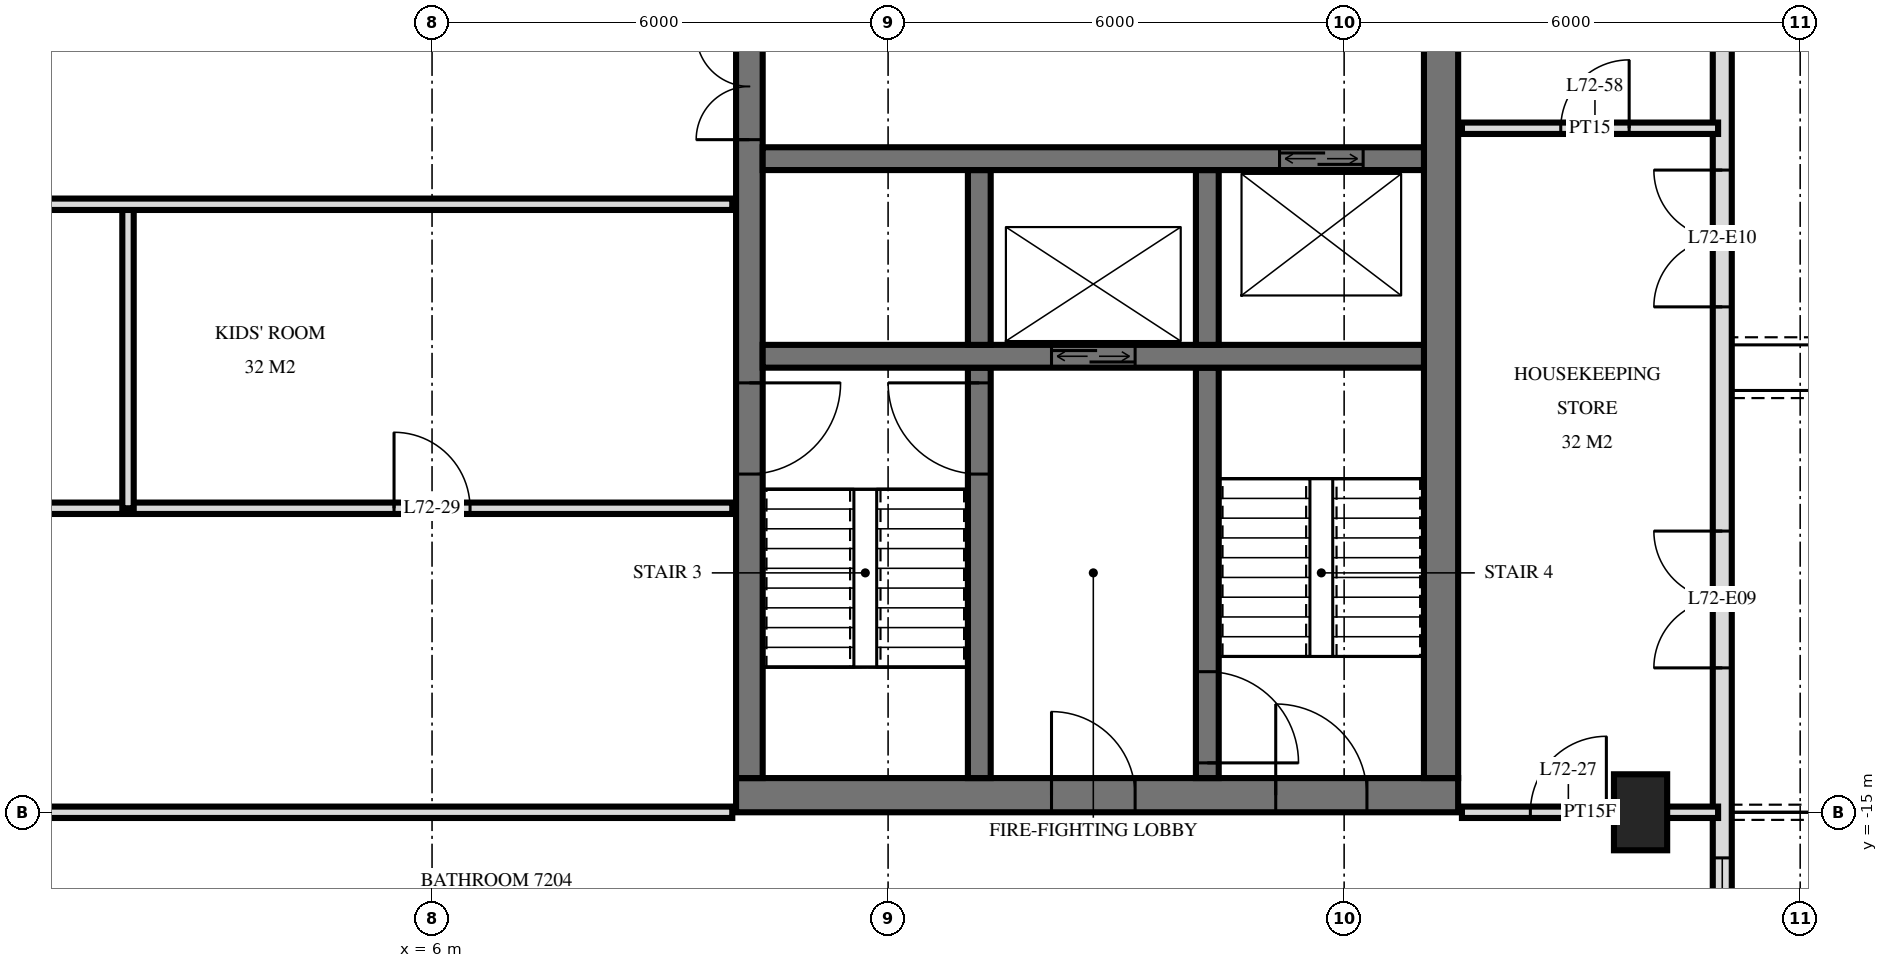
"""IFC4 building model, lengths in metres.
Left out: names, types, materials, properties, quantities, classifications, styles, units other than length and angle.
Written with IfcOpenShell. Run it as: python <this file> out.ifc"""

import sys

from ifc_helpers import new_model, si_unit, direction, frame, frame_2d, origin, origin_2d, place, context, subcontext, project, spatial, rectangle, extrude, element, fill, save


model = new_model("IFC4")
c1 = context("Model", 3, precision=1e-05, world=origin(), true_north=direction((0.0, 1.0)))
c2 = subcontext(c1, "Body", "Model", "MODEL_VIEW")
j1 = project(units=[si_unit("LENGTHUNIT", "METRE"), si_unit("PLANEANGLEUNIT", "RADIAN")], contexts=[c1])
p1 = place(None, origin())
s1 = spatial("IfcSite", under=j1, at=p1, CompositionType="ELEMENT")
p2 = place(p1, origin())
s2 = spatial("IfcBuilding", under=s1, at=p2, CompositionType="ELEMENT")
p3 = place(p2, frame((0.0, 0.0, 273.6)))
s3 = spatial("IfcBuildingStorey", under=s2, at=p3, CompositionType="ELEMENT", Elevation=273.6)
p4 = place(p3, frame((21.9, -15.0, 0.0), z_axis=(0.0, 0.0, 1.0), x_axis=(0.0, 1.0, 0.0)))
e1 = element("IfcColumn", 1, at=p4, inside=s3, PredefinedType="COLUMN", context=c2, shape_type="SweptSolid", body=[
    extrude(rectangle(XDim=1.0, YDim=0.7, at=origin_2d()), origin(), (0.0, 0.0, 1.0), 3.5),
])
p5 = place(p3, frame((10.0, -14.775, 0.0), z_axis=(0.0, 0.0, 1.0), x_axis=(1.0, 0.0, 0.0)))
e2 = element("IfcWall", 2, at=p5, inside=s3, PredefinedType="SHEAR", context=c2, shape_type="SweptSolid", body=[
    extrude(rectangle(XDim=9.5, YDim=0.45, at=frame_2d((4.75, 0.0))), origin(), (0.0, 0.0, 1.0), 3.5),
])
p6 = place(p5, frame((7.1, 0.0, 0.0)))
e3 = element("IfcOpeningElement", 3, at=p6, cuts=e2, PredefinedType="OPENING", context=c2, shape_type="SweptSolid", body=[
    extrude(rectangle(XDim=1.2, YDim=2.1, at=frame_2d((0.6, 1.05))), frame((0.0, 0.235, 0.0), z_axis=(0.0, -1.0, 0.0), x_axis=(1.0, 0.0, 0.0)), (0.0, 0.0, 1.0), 0.47),
])
p7 = place(p5, frame((4.15, 0.0, 0.0)))
e4 = element("IfcOpeningElement", 4, at=p7, cuts=e2, PredefinedType="OPENING", context=c2, shape_type="SweptSolid", body=[
    extrude(rectangle(XDim=1.1, YDim=2.1, at=frame_2d((0.55, 1.05))), frame((0.0, 0.235, 0.0), z_axis=(0.0, -1.0, 0.0), x_axis=(1.0, 0.0, 0.0)), (0.0, 0.0, 1.0), 0.47),
])
p8 = place(p3, frame((10.175, -14.55, 0.0), z_axis=(0.0, 0.0, 1.0), x_axis=(0.0, 1.0, 0.0)))
e5 = element("IfcWall", 5, at=p8, inside=s3, PredefinedType="SHEAR", context=c2, shape_type="SweptSolid", body=[
    extrude(rectangle(XDim=14.1, YDim=0.35, at=frame_2d((7.05, 0.0))), origin(), (0.0, 0.0, 1.0), 3.5),
])
p9 = place(p8, frame((8.4, 0.0, 0.0)))
e6 = element("IfcOpeningElement", 6, at=p9, cuts=e5, PredefinedType="OPENING", context=c2, shape_type="SweptSolid", body=[
    extrude(rectangle(XDim=1.4, YDim=2.4, at=frame_2d((0.7, 1.2))), frame((0.0, 0.185, 0.0), z_axis=(0.0, -1.0, 0.0), x_axis=(1.0, 0.0, 0.0)), (0.0, 0.0, 1.0), 0.37),
])
p10 = place(p8, frame((10.0, 0.0, 0.0)))
e7 = element("IfcOpeningElement", 7, at=p10, cuts=e5, PredefinedType="OPENING", context=c2, shape_type="SweptSolid", body=[
    extrude(rectangle(XDim=1.4, YDim=2.4, at=frame_2d((0.7, 1.2))), frame((0.0, 0.185, 0.0), z_axis=(0.0, -1.0, 0.0), x_axis=(1.0, 0.0, 0.0)), (0.0, 0.0, 1.0), 0.37),
])
p11 = place(p8, frame((4.0, 0.0, 0.0)))
e8 = element("IfcOpeningElement", 8, at=p11, cuts=e5, PredefinedType="OPENING", context=c2, shape_type="SweptSolid", body=[
    extrude(rectangle(XDim=1.2, YDim=2.1, at=frame_2d((0.6, 1.05))), frame((0.0, 0.185, 0.0), z_axis=(0.0, -1.0, 0.0), x_axis=(1.0, 0.0, 0.0)), (0.0, 0.0, 1.0), 0.37),
])
p12 = place(p3, frame((19.275, -14.55, 0.0), z_axis=(0.0, 0.0, 1.0), x_axis=(0.0, 1.0, 0.0)))
e9 = element("IfcWall", 9, at=p12, inside=s3, PredefinedType="SHEAR", context=c2, shape_type="SweptSolid", body=[
    extrude(rectangle(XDim=14.1, YDim=0.45, at=frame_2d((7.05, 0.0))), origin(), (0.0, 0.0, 1.0), 3.5),
])
p13 = place(p3, frame((10.35, -6.4, 0.0), z_axis=(0.0, 0.0, 1.0), x_axis=(1.0, 0.0, 0.0)))
e10 = element("IfcWall", 10, at=p13, inside=s3, PredefinedType="SHEAR", context=c2, shape_type="SweptSolid", body=[
    extrude(rectangle(XDim=8.7, YDim=0.3, at=frame_2d((4.35, 0.0))), origin(), (0.0, 0.0, 1.0), 3.5),
])
p14 = place(p13, frame((6.8, 0.0, 0.0)))
e11 = element("IfcOpeningElement", 11, at=p14, cuts=e10, PredefinedType="OPENING", context=c2, shape_type="SweptSolid", body=[
    extrude(rectangle(XDim=1.1, YDim=2.1, at=frame_2d((0.55, 1.05))), frame((0.0, 0.16, 0.0), z_axis=(0.0, -1.0, 0.0), x_axis=(1.0, 0.0, 0.0)), (0.0, 0.0, 1.0), 0.32),
])
p15 = place(p3, frame((10.35, -9.0, 0.0), z_axis=(0.0, 0.0, 1.0), x_axis=(1.0, 0.0, 0.0)))
e12 = element("IfcWall", 12, at=p15, inside=s3, PredefinedType="SHEAR", context=c2, shape_type="SweptSolid", body=[
    extrude(rectangle(XDim=8.7, YDim=0.3, at=frame_2d((4.35, 0.0))), origin(), (0.0, 0.0, 1.0), 3.5),
])
p16 = place(p15, frame((3.8, 0.0, 0.0)))
e13 = element("IfcOpeningElement", 13, at=p16, cuts=e12, PredefinedType="OPENING", context=c2, shape_type="SweptSolid", body=[
    extrude(rectangle(XDim=1.1, YDim=2.1, at=frame_2d((0.55, 1.05))), frame((0.0, 0.16, 0.0), z_axis=(0.0, -1.0, 0.0), x_axis=(1.0, 0.0, 0.0)), (0.0, 0.0, 1.0), 0.32),
])
p17 = place(p3, frame((13.2, -8.85, 0.0), z_axis=(0.0, 0.0, 1.0), x_axis=(0.0, 1.0, 0.0)))
e14 = element("IfcWall", 14, at=p17, inside=s3, PredefinedType="SHEAR", context=c2, shape_type="SweptSolid", body=[
    extrude(rectangle(XDim=2.3, YDim=0.3, at=frame_2d((1.15, 0.0))), origin(), (0.0, 0.0, 1.0), 3.5),
])
p18 = place(p3, frame((13.2, -14.55, 0.0), z_axis=(0.0, 0.0, 1.0), x_axis=(0.0, 1.0, 0.0)))
e15 = element("IfcWall", 15, at=p18, inside=s3, PredefinedType="SHEAR", context=c2, shape_type="SweptSolid", body=[
    extrude(rectangle(XDim=5.4, YDim=0.3, at=frame_2d((2.7, 0.0))), origin(), (0.0, 0.0, 1.0), 3.5),
])
p19 = place(p18, frame((4.0, 0.0, 0.0)))
e16 = element("IfcOpeningElement", 16, at=p19, cuts=e15, PredefinedType="OPENING", context=c2, shape_type="SweptSolid", body=[
    extrude(rectangle(XDim=1.2, YDim=2.1, at=frame_2d((0.6, 1.05))), frame((0.0, 0.16, 0.0), z_axis=(0.0, -1.0, 0.0), x_axis=(1.0, 0.0, 0.0)), (0.0, 0.0, 1.0), 0.32),
])
p20 = place(p3, frame((16.2, -8.85, 0.0), z_axis=(0.0, 0.0, 1.0), x_axis=(0.0, 1.0, 0.0)))
e17 = element("IfcWall", 17, at=p20, inside=s3, PredefinedType="SHEAR", context=c2, shape_type="SweptSolid", body=[
    extrude(rectangle(XDim=2.3, YDim=0.3, at=frame_2d((1.15, 0.0))), origin(), (0.0, 0.0, 1.0), 3.5),
])
p21 = place(p3, frame((16.2, -14.55, 0.0), z_axis=(0.0, 0.0, 1.0), x_axis=(0.0, 1.0, 0.0)))
e18 = element("IfcWall", 18, at=p21, inside=s3, PredefinedType="SHEAR", context=c2, shape_type="SweptSolid", body=[
    extrude(rectangle(XDim=5.4, YDim=0.3, at=frame_2d((2.7, 0.0))), origin(), (0.0, 0.0, 1.0), 3.5),
])
p22 = place(p21, frame((0.2, 0.0, 0.0)))
e19 = element("IfcOpeningElement", 19, at=p22, cuts=e18, PredefinedType="OPENING", context=c2, shape_type="SweptSolid", body=[
    extrude(rectangle(XDim=1.2, YDim=2.1, at=frame_2d((0.6, 1.05))), frame((0.0, 0.16, 0.0), z_axis=(0.0, -1.0, 0.0), x_axis=(1.0, 0.0, 0.0)), (0.0, 0.0, 1.0), 0.32),
])
p23 = place(p3, frame((22.975, -29.275, 0.0), z_axis=(0.0, 0.0, 1.0), x_axis=(0.0, 1.0, 0.0)))
e20 = element("IfcWall", 20, at=p23, inside=s3, PredefinedType="SOLIDWALL", context=c2, shape_type="SweptSolid", body=[
    extrude(rectangle(XDim=25.951, YDim=0.25, at=frame_2d((12.975, 0.0))), origin(), (0.0, 0.0, 1.0), 3.22),
])
p24 = place(p23, frame((0.575, 0.0, 0.0)))
e21 = element("IfcOpeningElement", 21, at=p24, cuts=e20, PredefinedType="OPENING", context=c2, shape_type="SweptSolid", body=[
    extrude(rectangle(XDim=1.8, YDim=2.4, at=frame_2d((0.9, 1.2))), frame((0.0, 0.135, 0.0), z_axis=(0.0, -1.0, 0.0), x_axis=(1.0, 0.0, 0.0)), (0.0, 0.0, 1.0), 0.27),
])
p25 = place(p23, frame((3.325, 0.0, 0.9)))
e22 = element("IfcOpeningElement", 22, at=p25, cuts=e20, PredefinedType="OPENING", context=c2, shape_type="SweptSolid", body=[
    extrude(rectangle(XDim=1.8, YDim=1.5, at=frame_2d((0.9, 0.75))), frame((0.0, 0.135, 0.0), z_axis=(0.0, -1.0, 0.0), x_axis=(1.0, 0.0, 0.0)), (0.0, 0.0, 1.0), 0.27),
])
p26 = place(p23, frame((6.075, 0.0, 0.0)))
e23 = element("IfcOpeningElement", 23, at=p26, cuts=e20, PredefinedType="OPENING", context=c2, shape_type="SweptSolid", body=[
    extrude(rectangle(XDim=1.8, YDim=2.4, at=frame_2d((0.9, 1.2))), frame((0.0, 0.135, 0.0), z_axis=(0.0, -1.0, 0.0), x_axis=(1.0, 0.0, 0.0)), (0.0, 0.0, 1.0), 0.27),
])
p27 = place(p23, frame((12.475, 0.0, 0.9)))
e24 = element("IfcOpeningElement", 24, at=p27, cuts=e20, PredefinedType="OPENING", context=c2, shape_type="SweptSolid", body=[
    extrude(rectangle(XDim=1.2, YDim=1.5, at=frame_2d((0.6, 0.75))), frame((0.0, 0.135, 0.0), z_axis=(0.0, -1.0, 0.0), x_axis=(1.0, 0.0, 0.0)), (0.0, 0.0, 1.0), 0.27),
])
p28 = place(p23, frame((16.175, 0.0, 0.0)))
e25 = element("IfcOpeningElement", 25, at=p28, cuts=e20, PredefinedType="OPENING", context=c2, shape_type="SweptSolid", body=[
    extrude(rectangle(XDim=1.8, YDim=2.4, at=frame_2d((0.9, 1.2))), frame((0.0, 0.135, 0.0), z_axis=(0.0, -1.0, 0.0), x_axis=(1.0, 0.0, 0.0)), (0.0, 0.0, 1.0), 0.27),
])
p29 = place(p23, frame((20.925, 0.0, 0.0)))
e26 = element("IfcOpeningElement", 26, at=p29, cuts=e20, PredefinedType="OPENING", context=c2, shape_type="SweptSolid", body=[
    extrude(rectangle(XDim=1.8, YDim=2.4, at=frame_2d((0.9, 1.2))), frame((0.0, 0.135, 0.0), z_axis=(0.0, -1.0, 0.0), x_axis=(1.0, 0.0, 0.0)), (0.0, 0.0, 1.0), 0.27),
])
p30 = place(p3, frame((2.0, -11.0, 0.0), z_axis=(0.0, 0.0, 1.0), x_axis=(0.0, 1.0, 0.0)))
e27 = element("IfcWall", 27, at=p30, inside=s3, PredefinedType="PARTITIONING", context=c2, shape_type="SweptSolid", body=[
    extrude(rectangle(XDim=4.0, YDim=0.15, at=frame_2d((2.0, 0.0))), origin(), (0.0, 0.0, 1.0), 3.22),
])
p31 = place(p3, frame((-9.95, -15.0, 0.0), z_axis=(0.0, 0.0, 1.0), x_axis=(1.0, 0.0, 0.0)))
e28 = element("IfcWall", 28, at=p31, inside=s3, PredefinedType="PARTITIONING", context=c2, shape_type="SweptSolid", body=[
    extrude(rectangle(XDim=19.9, YDim=0.15, at=frame_2d((9.95, 0.0))), origin(), (0.0, 0.0, 1.0), 2.584),
])
p32 = place(p31, frame((9.45, 0.0, 0.0)))
e29 = element("IfcOpeningElement", 29, at=p32, cuts=e28, PredefinedType="OPENING", context=c2, shape_type="SweptSolid", body=[
    extrude(rectangle(XDim=1.0, YDim=2.1, at=frame_2d((0.5, 1.05))), frame((0.0, 0.085, 0.0), z_axis=(0.0, -1.0, 0.0), x_axis=(1.0, 0.0, 0.0)), (0.0, 0.0, 1.0), 0.17),
])
p33 = place(p3, frame((19.55, -15.0, 0.0), z_axis=(0.0, 0.0, 1.0), x_axis=(1.0, 0.0, 0.0)))
e30 = element("IfcWall", 30, at=p33, inside=s3, PredefinedType="PARTITIONING", context=c2, shape_type="SweptSolid", body=[
    extrude(rectangle(XDim=3.37, YDim=0.15, at=frame_2d((1.685, 0.0))), origin(), (0.0, 0.0, 1.0), 3.22),
])
p34 = place(p33, frame((0.9, 0.0, 0.0)))
e31 = element("IfcOpeningElement", 31, at=p34, cuts=e30, PredefinedType="OPENING", context=c2, shape_type="SweptSolid", body=[
    extrude(rectangle(XDim=1.0, YDim=2.1, at=frame_2d((0.5, 1.05))), frame((0.0, 0.085, 0.0), z_axis=(0.0, -1.0, 0.0), x_axis=(1.0, 0.0, 0.0)), (0.0, 0.0, 1.0), 0.17),
])
p35 = place(p3, frame((-9.95, -11.0, 0.0), z_axis=(0.0, 0.0, 1.0), x_axis=(1.0, 0.0, 0.0)))
e32 = element("IfcWall", 32, at=p35, inside=s3, PredefinedType="PARTITIONING", context=c2, shape_type="SweptSolid", body=[
    extrude(rectangle(XDim=19.9, YDim=0.15, at=frame_2d((9.95, 0.0))), origin(), (0.0, 0.0, 1.0), 3.22),
])
p36 = place(p35, frame((9.45, 0.0, 0.0)))
e33 = element("IfcOpeningElement", 33, at=p36, cuts=e32, PredefinedType="OPENING", context=c2, shape_type="SweptSolid", body=[
    extrude(rectangle(XDim=1.0, YDim=2.1, at=frame_2d((0.5, 1.05))), frame((0.0, 0.085, 0.0), z_axis=(0.0, -1.0, 0.0), x_axis=(1.0, 0.0, 0.0)), (0.0, 0.0, 1.0), 0.17),
])
p37 = place(p35, frame((15.45, 0.0, 0.0)))
e34 = element("IfcOpeningElement", 34, at=p37, cuts=e32, PredefinedType="OPENING", context=c2, shape_type="SweptSolid", body=[
    extrude(rectangle(XDim=1.0, YDim=2.1, at=frame_2d((0.5, 1.05))), frame((0.0, 0.085, 0.0), z_axis=(0.0, -1.0, 0.0), x_axis=(1.0, 0.0, 0.0)), (0.0, 0.0, 1.0), 0.17),
])
p38 = place(p3, frame((-9.95, -7.0, 0.0), z_axis=(0.0, 0.0, 1.0), x_axis=(1.0, 0.0, 0.0)))
e35 = element("IfcWall", 35, at=p38, inside=s3, PredefinedType="PARTITIONING", context=c2, shape_type="SweptSolid", body=[
    extrude(rectangle(XDim=19.9, YDim=0.15, at=frame_2d((9.95, 0.0))), origin(), (0.0, 0.0, 1.0), 3.22),
])
p39 = place(p38, frame((9.45, 0.0, 0.0)))
e36 = element("IfcOpeningElement", 36, at=p39, cuts=e35, PredefinedType="OPENING", context=c2, shape_type="SweptSolid", body=[
    extrude(rectangle(XDim=1.0, YDim=2.1, at=frame_2d((0.5, 1.05))), frame((0.0, 0.085, 0.0), z_axis=(0.0, -1.0, 0.0), x_axis=(1.0, 0.0, 0.0)), (0.0, 0.0, 1.0), 0.17),
])
p40 = place(p38, frame((3.45, 0.0, 0.0)))
e37 = element("IfcOpeningElement", 37, at=p40, cuts=e35, PredefinedType="OPENING", context=c2, shape_type="SweptSolid", body=[
    extrude(rectangle(XDim=1.0, YDim=2.1, at=frame_2d((0.5, 1.05))), frame((0.0, 0.085, 0.0), z_axis=(0.0, -1.0, 0.0), x_axis=(1.0, 0.0, 0.0)), (0.0, 0.0, 1.0), 0.17),
])
p41 = place(p3, frame((19.55, -6.0, 0.0), z_axis=(0.0, 0.0, 1.0), x_axis=(1.0, 0.0, 0.0)))
e38 = element("IfcWall", 38, at=p41, inside=s3, PredefinedType="PARTITIONING", context=c2, shape_type="SweptSolid", body=[
    extrude(rectangle(XDim=3.37, YDim=0.15, at=frame_2d((1.685, 0.0))), origin(), (0.0, 0.0, 1.0), 3.22),
])
p42 = place(p41, frame((1.3, 0.0, 0.0)))
e39 = element("IfcOpeningElement", 39, at=p42, cuts=e38, PredefinedType="OPENING", context=c2, shape_type="SweptSolid", body=[
    extrude(rectangle(XDim=0.9, YDim=2.1, at=frame_2d((0.45, 1.05))), frame((0.0, 0.085, 0.0), z_axis=(0.0, -1.0, 0.0), x_axis=(1.0, 0.0, 0.0)), (0.0, 0.0, 1.0), 0.17),
])
p43 = place(p27, origin())
e40 = element("IfcWindow", 40, at=p43, inside=s3, PartitioningType="SINGLE_PANEL", PredefinedType="WINDOW", context=c2, shape_type="SweptSolid", body=[
    extrude(rectangle(XDim=1.2, YDim=1.5, at=frame_2d((0.6, 0.75))), frame((0.0, 0.03, 0.0), z_axis=(0.0, -1.0, 0.0), x_axis=(1.0, 0.0, 0.0)), (0.0, 0.0, 1.0), 0.06),
])
fill(e24, e40)
p44 = place(p28, origin())
e41 = element("IfcDoor", 41, at=p44, inside=s3, OperationType="DOUBLE_DOOR_SINGLE_SWING", PredefinedType="DOOR", context=c2, shape_type="SweptSolid", body=[
    extrude(rectangle(XDim=1.8, YDim=2.4, at=frame_2d((0.9, 1.2))), frame((0.0, 0.025, 0.0), z_axis=(0.0, -1.0, 0.0), x_axis=(1.0, 0.0, 0.0)), (0.0, 0.0, 1.0), 0.05),
])
fill(e25, e41)
p45 = place(p29, origin())
e42 = element("IfcDoor", 42, at=p45, inside=s3, OperationType="DOUBLE_DOOR_SINGLE_SWING", PredefinedType="DOOR", context=c2, shape_type="SweptSolid", body=[
    extrude(rectangle(XDim=1.8, YDim=2.4, at=frame_2d((0.9, 1.2))), frame((0.0, 0.025, 0.0), z_axis=(0.0, -1.0, 0.0), x_axis=(1.0, 0.0, 0.0)), (0.0, 0.0, 1.0), 0.05),
])
fill(e26, e42)
p46 = place(p16, origin())
e43 = element("IfcDoor", 43, at=p46, inside=s3, OperationType="DOUBLE_DOOR_SLIDING", PredefinedType="USERDEFINED", context=c2, shape_type="SweptSolid", body=[
    extrude(rectangle(XDim=1.1, YDim=2.1, at=frame_2d((0.55, 1.05))), frame((0.0, 0.025, 0.0), z_axis=(0.0, -1.0, 0.0), x_axis=(1.0, 0.0, 0.0)), (0.0, 0.0, 1.0), 0.05),
])
fill(e13, e43)
p47 = place(p14, origin())
e44 = element("IfcDoor", 44, at=p47, inside=s3, OperationType="DOUBLE_DOOR_SLIDING", PredefinedType="USERDEFINED", context=c2, shape_type="SweptSolid", body=[
    extrude(rectangle(XDim=1.1, YDim=2.1, at=frame_2d((0.55, 1.05))), frame((0.0, 0.025, 0.0), z_axis=(0.0, -1.0, 0.0), x_axis=(1.0, 0.0, 0.0)), (0.0, 0.0, 1.0), 0.05),
])
fill(e11, e44)
p48 = place(p9, origin())
e45 = element("IfcDoor", 45, at=p48, inside=s3, OperationType="DOUBLE_DOOR_SINGLE_SWING", PredefinedType="DOOR", context=c2, shape_type="SweptSolid", body=[
    extrude(rectangle(XDim=1.4, YDim=2.4, at=frame_2d((0.7, 1.2))), frame((0.0, 0.025, 0.0), z_axis=(0.0, -1.0, 0.0), x_axis=(1.0, 0.0, 0.0)), (0.0, 0.0, 1.0), 0.05),
])
fill(e6, e45)
p49 = place(p11, frame((0.6, 0.0, 0.0), z_axis=(0.0, 0.0, 1.0), x_axis=(-1.0, 0.0, 0.0)))
e46 = element("IfcDoor", 46, at=p49, inside=s3, OperationType="SINGLE_SWING_RIGHT", PredefinedType="DOOR", context=c2, shape_type="SweptSolid", body=[
    extrude(rectangle(XDim=1.2, YDim=2.1, at=frame_2d((0.0, 1.05))), frame((0.0, -0.025, 0.0), z_axis=(0.0, 1.0, 0.0), x_axis=(-1.0, 0.0, 0.0)), (0.0, 0.0, 1.0), 0.05),
])
fill(e8, e46)
p50 = place(p6, origin())
e47 = element("IfcDoor", 47, at=p50, inside=s3, OperationType="SINGLE_SWING_RIGHT", PredefinedType="DOOR", context=c2, shape_type="SweptSolid", body=[
    extrude(rectangle(XDim=1.2, YDim=2.1, at=frame_2d((0.6, 1.05))), frame((0.0, 0.025, 0.0), z_axis=(0.0, -1.0, 0.0), x_axis=(1.0, 0.0, 0.0)), (0.0, 0.0, 1.0), 0.05),
])
fill(e3, e47)
p51 = place(p7, origin())
e48 = element("IfcDoor", 48, at=p51, inside=s3, OperationType="SINGLE_SWING_RIGHT", PredefinedType="DOOR", context=c2, shape_type="SweptSolid", body=[
    extrude(rectangle(XDim=1.1, YDim=2.1, at=frame_2d((0.55, 1.05))), frame((0.0, 0.025, 0.0), z_axis=(0.0, -1.0, 0.0), x_axis=(1.0, 0.0, 0.0)), (0.0, 0.0, 1.0), 0.05),
])
fill(e4, e48)
p52 = place(p19, origin())
e49 = element("IfcDoor", 49, at=p52, inside=s3, OperationType="SINGLE_SWING_LEFT", PredefinedType="DOOR", context=c2, shape_type="SweptSolid", body=[
    extrude(rectangle(XDim=1.2, YDim=2.1, at=frame_2d((0.6, 1.05))), frame((0.0, 0.025, 0.0), z_axis=(0.0, -1.0, 0.0), x_axis=(1.0, 0.0, 0.0)), (0.0, 0.0, 1.0), 0.05),
])
fill(e16, e49)
p53 = place(p22, frame((0.6, 0.0, 0.0), z_axis=(0.0, 0.0, 1.0), x_axis=(-1.0, 0.0, 0.0)))
e50 = element("IfcDoor", 50, at=p53, inside=s3, OperationType="SINGLE_SWING_LEFT", PredefinedType="DOOR", context=c2, shape_type="SweptSolid", body=[
    extrude(rectangle(XDim=1.2, YDim=2.1, at=frame_2d((0.0, 1.05))), frame((0.0, -0.025, 0.0), z_axis=(0.0, 1.0, 0.0), x_axis=(-1.0, 0.0, 0.0)), (0.0, 0.0, 1.0), 0.05),
])
fill(e19, e50)
p54 = place(p34, origin())
e51 = element("IfcDoor", 51, at=p54, inside=s3, OperationType="SINGLE_SWING_LEFT", PredefinedType="DOOR", context=c2, shape_type="SweptSolid", body=[
    extrude(rectangle(XDim=1.0, YDim=2.1, at=frame_2d((0.5, 1.05))), frame((0.0, 0.025, 0.0), z_axis=(0.0, -1.0, 0.0), x_axis=(1.0, 0.0, 0.0)), (0.0, 0.0, 1.0), 0.05),
])
fill(e31, e51)
p55 = place(p37, origin())
e52 = element("IfcDoor", 52, at=p55, inside=s3, OperationType="SINGLE_SWING_RIGHT", PredefinedType="DOOR", context=c2, shape_type="SweptSolid", body=[
    extrude(rectangle(XDim=1.0, YDim=2.1, at=frame_2d((0.5, 1.05))), frame((0.0, 0.025, 0.0), z_axis=(0.0, -1.0, 0.0), x_axis=(1.0, 0.0, 0.0)), (0.0, 0.0, 1.0), 0.05),
])
fill(e34, e52)
p56 = place(p42, origin())
e53 = element("IfcDoor", 53, at=p56, inside=s3, OperationType="SINGLE_SWING_LEFT", PredefinedType="DOOR", context=c2, shape_type="SweptSolid", body=[
    extrude(rectangle(XDim=0.9, YDim=2.1, at=frame_2d((0.45, 1.05))), frame((0.0, 0.025, 0.0), z_axis=(0.0, -1.0, 0.0), x_axis=(1.0, 0.0, 0.0)), (0.0, 0.0, 1.0), 0.05),
])
fill(e39, e53)
save(model, sys.argv[1])
